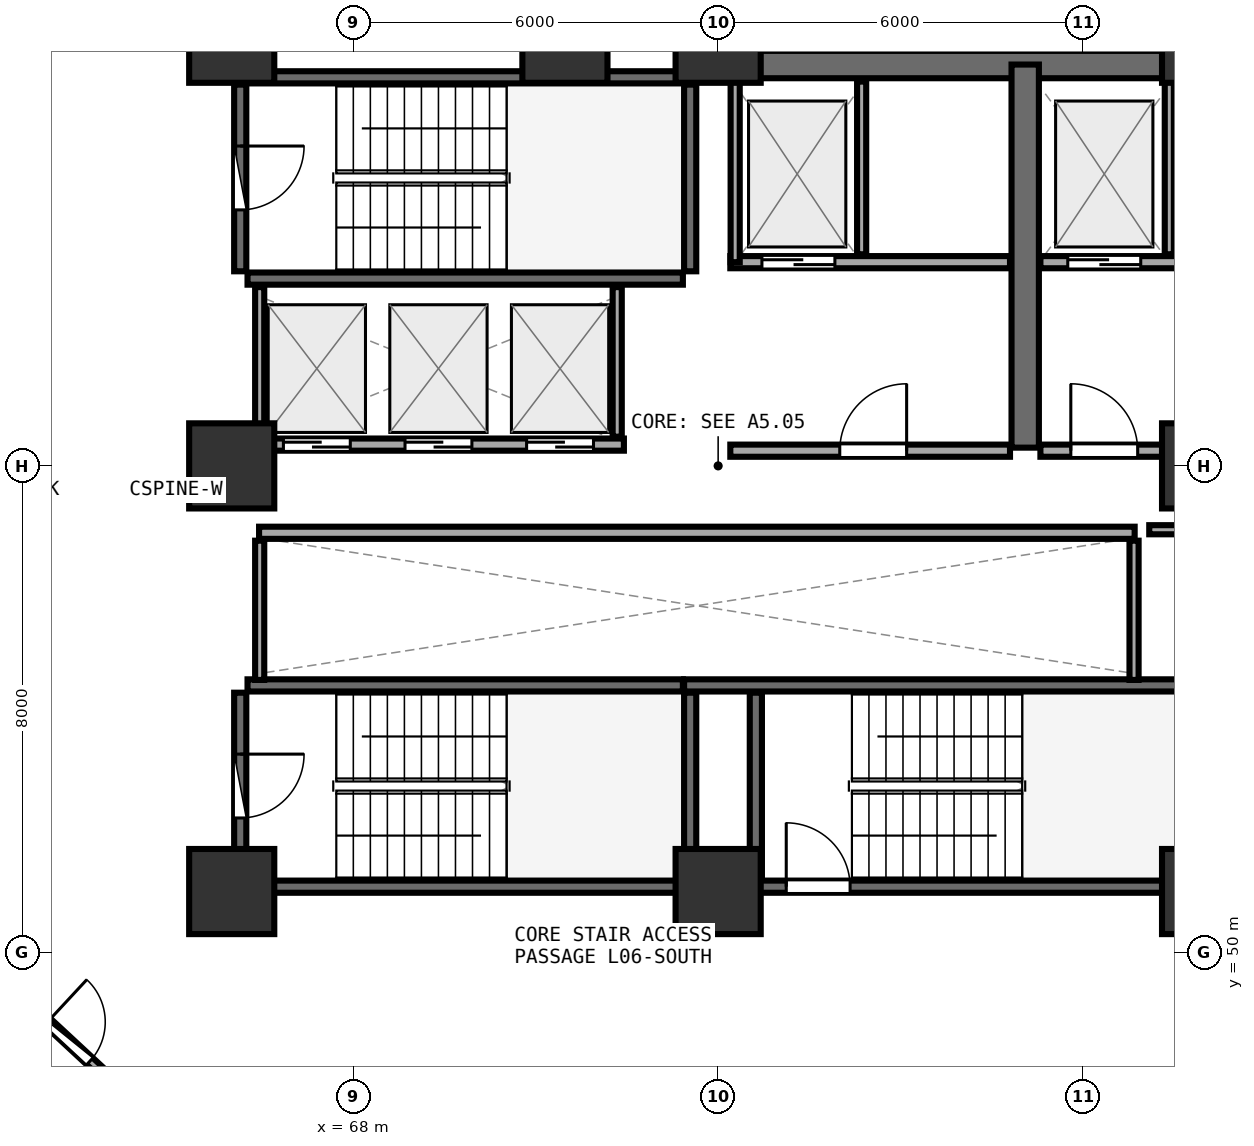
"""IFC4 building model, lengths in metres.
Left out: names, types, materials, properties, quantities, classifications, styles, units other than length and angle.
Written with IfcOpenShell. Run it as: python <this file> out.ifc"""

import sys

from ifc_helpers import new_model, si_unit, direction, frame, frame_2d, origin, origin_2d, place, context, subcontext, project, spatial, rectangle, extrude, element, fill, save


model = new_model("IFC4")
c1 = context("Model", 3, precision=1e-05, world=origin(), true_north=direction((0.0, 1.0)))
c2 = subcontext(c1, "Body", "Model", "MODEL_VIEW")
j1 = project(units=[si_unit("LENGTHUNIT", "METRE"), si_unit("PLANEANGLEUNIT", "RADIAN")], contexts=[c1])
p1 = place(None, origin())
s1 = spatial("IfcSite", under=j1, at=p1, CompositionType="ELEMENT")
p2 = place(p1, origin())
s2 = spatial("IfcBuilding", under=s1, at=p2, CompositionType="ELEMENT")
p3 = place(p2, frame((0.0, 0.0, 26.25)))
s3 = spatial("IfcBuildingStorey", under=s2, at=p3, CompositionType="ELEMENT", Elevation=26.25)
for number, where, z_axis, x_axis in (
    (1, (66.0, 51.0, 0.0), (0.0, 0.0, 1.0), (1.0, 0.0, 0.0)),
    (2, (74.0, 51.0, 0.0), (0.0, 0.0, 1.0), (1.0, 0.0, 0.0)),
    (3, (82.0, 51.0, 0.0), (0.0, 0.0, 1.0), (1.0, 0.0, 0.0)),
    (4, (82.0, 58.0, 0.0), (0.0, 0.0, 1.0), (1.0, 0.0, 0.0)),
    (5, (82.0, 65.0, 0.0), (0.0, 0.0, 1.0), (1.0, 0.0, 0.0)),
    (6, (74.0, 65.0, 0.0), (0.0, 0.0, 1.0), (1.0, 0.0, 0.0)),
    (7, (71.48, 65.0, 0.0), (0.0, 0.0, 1.0), (1.0, 0.0, 0.0)),
    (8, (66.0, 65.0, 0.0), (0.0, 0.0, 1.0), (1.0, 0.0, 0.0)),
    (9, (66.0, 58.0, 0.0), (0.0, 0.0, 1.0), (1.0, 0.0, 0.0)),
):
    element("IfcColumn", number, at=place(p3, frame(where, z_axis=z_axis, x_axis=x_axis)), inside=s3, PredefinedType="PILASTER", context=c2, shape_type="SweptSolid", body=[
        extrude(rectangle(XDim=1.4, YDim=1.4, at=origin_2d()), origin(), (0.0, 0.0, 1.0), 3.75),
    ])
p4 = place(p3, frame((66.26, 61.08, 0.0), z_axis=(0.0, 0.0, 1.0), x_axis=(1.0, 0.0, 0.0)))
e10 = element("IfcWall", 10, at=p4, inside=s3, PredefinedType="SHEAR", context=c2, shape_type="SweptSolid", body=[
    extrude(rectangle(XDim=7.16, YDim=0.2, at=frame_2d((3.58, 0.0))), origin(), (0.0, 0.0, 1.0), 3.49),
])
p5 = place(p3, frame((73.54, 61.2, 0.0), z_axis=(0.0, 0.0, 1.0), x_axis=(0.0, 1.0, 0.0)))
e11 = element("IfcWall", 11, at=p5, inside=s3, PredefinedType="SHEAR", context=c2, shape_type="SweptSolid", body=[
    extrude(rectangle(XDim=3.07, YDim=0.2, at=frame_2d((1.535, 0.0))), origin(), (0.0, 0.0, 1.0), 3.49),
])
p6 = place(p3, frame((73.42, 64.39, 0.0), z_axis=(0.0, 0.0, 1.0), x_axis=(-1.0, 0.0, 0.0)))
e12 = element("IfcWall", 12, at=p6, inside=s3, PredefinedType="SHEAR", context=c2, shape_type="SweptSolid", body=[
    extrude(rectangle(XDim=7.16, YDim=0.2, at=frame_2d((3.58, 0.0))), origin(), (0.0, 0.0, 1.0), 3.49),
])
p7 = place(p3, frame((66.14, 64.27, 0.0), z_axis=(0.0, 0.0, 1.0), x_axis=(0.0, -1.0, 0.0)))
e13 = element("IfcWall", 13, at=p7, inside=s3, PredefinedType="SHEAR", context=c2, shape_type="SweptSolid", body=[
    extrude(rectangle(XDim=3.07, YDim=0.2, at=frame_2d((1.535, 0.0))), origin(), (0.0, 0.0, 1.0), 3.49),
])
p8 = place(p7, frame((1.01, 0.0, 0.0)))
e14 = element("IfcOpeningElement", 14, at=p8, cuts=e13, PredefinedType="OPENING", context=c2, shape_type="SweptSolid", body=[
    extrude(rectangle(XDim=1.05, YDim=2.1, at=frame_2d((0.525, 1.05))), frame((0.0, 0.11, 0.0), z_axis=(0.0, -1.0, 0.0), x_axis=(1.0, 0.0, 0.0)), (0.0, 0.0, 1.0), 0.22),
])
p9 = place(p3, frame((74.0, 51.08, 0.0), z_axis=(0.0, 0.0, 1.0), x_axis=(1.0, 0.0, 0.0)))
e15 = element("IfcWall", 15, at=p9, inside=s3, PredefinedType="SHEAR", context=c2, shape_type="SweptSolid", body=[
    extrude(rectangle(XDim=7.9, YDim=0.2, at=frame_2d((3.95, 0.0))), origin(), (0.0, 0.0, 1.0), 3.49),
])
p10 = place(p9, frame((1.12, 0.0, 0.0)))
e16 = element("IfcOpeningElement", 16, at=p10, cuts=e15, PredefinedType="OPENING", context=c2, shape_type="SweptSolid", body=[
    extrude(rectangle(XDim=1.05, YDim=2.1, at=frame_2d((0.525, 1.05))), frame((0.0, 0.11, 0.0), z_axis=(0.0, -1.0, 0.0), x_axis=(1.0, 0.0, 0.0)), (0.0, 0.0, 1.0), 0.22),
])
p11 = place(p3, frame((81.9, 54.39, 0.0), z_axis=(0.0, 0.0, 1.0), x_axis=(-1.0, 0.0, 0.0)))
e17 = element("IfcWall", 17, at=p11, inside=s3, PredefinedType="SHEAR", context=c2, shape_type="SweptSolid", body=[
    extrude(rectangle(XDim=8.46, YDim=0.2, at=frame_2d((4.23, 0.0))), origin(), (0.0, 0.0, 1.0), 3.49),
])
p12 = place(p3, frame((74.62, 54.27, 0.0), z_axis=(0.0, 0.0, 1.0), x_axis=(0.0, -1.0, 0.0)))
e18 = element("IfcWall", 18, at=p12, inside=s3, PredefinedType="SHEAR", context=c2, shape_type="SweptSolid", body=[
    extrude(rectangle(XDim=3.07, YDim=0.2, at=frame_2d((1.535, 0.0))), origin(), (0.0, 0.0, 1.0), 3.49),
])
p13 = place(p3, frame((66.26, 51.08, 0.0), z_axis=(0.0, 0.0, 1.0), x_axis=(1.0, 0.0, 0.0)))
e19 = element("IfcWall", 19, at=p13, inside=s3, PredefinedType="SHEAR", context=c2, shape_type="SweptSolid", body=[
    extrude(rectangle(XDim=7.16, YDim=0.2, at=frame_2d((3.58, 0.0))), origin(), (0.0, 0.0, 1.0), 3.49),
])
p14 = place(p3, frame((73.54, 51.2, 0.0), z_axis=(0.0, 0.0, 1.0), x_axis=(0.0, 1.0, 0.0)))
e20 = element("IfcWall", 20, at=p14, inside=s3, PredefinedType="SHEAR", context=c2, shape_type="SweptSolid", body=[
    extrude(rectangle(XDim=3.07, YDim=0.2, at=frame_2d((1.535, 0.0))), origin(), (0.0, 0.0, 1.0), 3.49),
])
p15 = place(p3, frame((73.42, 54.39, 0.0), z_axis=(0.0, 0.0, 1.0), x_axis=(-1.0, 0.0, 0.0)))
e21 = element("IfcWall", 21, at=p15, inside=s3, PredefinedType="SHEAR", context=c2, shape_type="SweptSolid", body=[
    extrude(rectangle(XDim=7.16, YDim=0.2, at=frame_2d((3.58, 0.0))), origin(), (0.0, 0.0, 1.0), 3.49),
])
p16 = place(p3, frame((66.14, 54.27, 0.0), z_axis=(0.0, 0.0, 1.0), x_axis=(0.0, -1.0, 0.0)))
e22 = element("IfcWall", 22, at=p16, inside=s3, PredefinedType="SHEAR", context=c2, shape_type="SweptSolid", body=[
    extrude(rectangle(XDim=3.07, YDim=0.2, at=frame_2d((1.535, 0.0))), origin(), (0.0, 0.0, 1.0), 3.49),
])
p17 = place(p16, frame((1.01, 0.0, 0.0)))
e23 = element("IfcOpeningElement", 23, at=p17, cuts=e22, PredefinedType="OPENING", context=c2, shape_type="SweptSolid", body=[
    extrude(rectangle(XDim=1.05, YDim=2.1, at=frame_2d((0.525, 1.05))), frame((0.0, 0.11, 0.0), z_axis=(0.0, -1.0, 0.0), x_axis=(1.0, 0.0, 0.0)), (0.0, 0.0, 1.0), 0.22),
])
p18 = place(p3, frame((74.0, 64.6, 0.0), z_axis=(0.0, 0.0, 1.0), x_axis=(1.0, 0.0, 0.0)))
e24 = element("IfcWall", 24, at=p18, inside=s3, PredefinedType="SHEAR", context=c2, shape_type="SweptSolid", body=[
    extrude(rectangle(XDim=8.0, YDim=0.45, at=frame_2d((4.0, 0.0))), origin(), (0.0, 0.0, 1.0), 3.49),
])
p19 = place(p3, frame((79.05, 58.3, 0.0), z_axis=(0.0, 0.0, 1.0), x_axis=(0.0, 1.0, 0.0)))
e25 = element("IfcWall", 25, at=p19, inside=s3, PredefinedType="SHEAR", context=c2, shape_type="SweptSolid", body=[
    extrude(rectangle(XDim=6.3, YDim=0.45, at=frame_2d((3.15, 0.0))), origin(), (0.0, 0.0, 1.0), 3.49),
])
p20 = place(p3, frame((74.2, 61.35, 0.0), z_axis=(0.0, 0.0, 1.0), x_axis=(1.0, 0.0, 0.0)))
e26 = element("IfcWall", 26, at=p20, inside=s3, PredefinedType="SOLIDWALL", context=c2, shape_type="SweptSolid", body=[
    extrude(rectangle(XDim=4.6, YDim=0.2, at=frame_2d((2.3, 0.0))), origin(), (0.0, 0.0, 1.0), 3.48),
])
p21 = place(p20, frame((0.52, 0.0, 0.0)))
e27 = element("IfcOpeningElement", 27, at=p21, cuts=e26, PredefinedType="OPENING", context=c2, shape_type="SweptSolid", body=[
    extrude(rectangle(XDim=1.2, YDim=2.15, at=frame_2d((0.6, 1.075))), frame((0.0, 0.11, 0.0), z_axis=(0.0, -1.0, 0.0), x_axis=(1.0, 0.0, 0.0)), (0.0, 0.0, 1.0), 0.22),
])
p22 = place(p3, frame((74.28, 61.35, 0.0), z_axis=(0.0, 0.0, 1.0), x_axis=(0.0, 1.0, 0.0)))
e28 = element("IfcWall", 28, at=p22, inside=s3, PredefinedType="PARTITIONING", context=c2, shape_type="SweptSolid", body=[
    extrude(rectangle(XDim=2.97, YDim=0.15, at=frame_2d((1.485, 0.0))), origin(), (0.0, 0.0, 1.0), 3.48),
])
p23 = place(p3, frame((76.36, 61.48, 0.0), z_axis=(0.0, 0.0, 1.0), x_axis=(0.0, 1.0, 0.0)))
e29 = element("IfcWall", 29, at=p23, inside=s3, PredefinedType="PARTITIONING", context=c2, shape_type="SweptSolid", body=[
    extrude(rectangle(XDim=2.84, YDim=0.15, at=frame_2d((1.42, 0.0))), origin(), (0.0, 0.0, 1.0), 3.48),
])
p24 = place(p3, frame((79.3, 61.35, 0.0), z_axis=(0.0, 0.0, 1.0), x_axis=(1.0, 0.0, 0.0)))
e30 = element("IfcWall", 30, at=p24, inside=s3, PredefinedType="SOLIDWALL", context=c2, shape_type="SweptSolid", body=[
    extrude(rectangle(XDim=4.0, YDim=0.2, at=frame_2d((2.0, 0.0))), origin(), (0.0, 0.0, 1.0), 2.775),
])
p25 = place(p24, frame((0.45, 0.0, 0.0)))
e31 = element("IfcOpeningElement", 31, at=p25, cuts=e30, PredefinedType="OPENING", context=c2, shape_type="SweptSolid", body=[
    extrude(rectangle(XDim=1.2, YDim=2.15, at=frame_2d((0.6, 1.075))), frame((0.0, 0.11, 0.0), z_axis=(0.0, -1.0, 0.0), x_axis=(1.0, 0.0, 0.0)), (0.0, 0.0, 1.0), 0.22),
])
p26 = place(p3, frame((81.42, 61.48, 0.0), z_axis=(0.0, 0.0, 1.0), x_axis=(0.0, 1.0, 0.0)))
e32 = element("IfcWall", 32, at=p26, inside=s3, PredefinedType="PARTITIONING", context=c2, shape_type="SweptSolid", body=[
    extrude(rectangle(XDim=2.84, YDim=0.15, at=frame_2d((1.42, 0.0))), origin(), (0.0, 0.0, 1.0), 3.48),
])
p27 = place(p3, frame((74.2, 58.25, 0.0), z_axis=(0.0, 0.0, 1.0), x_axis=(1.0, 0.0, 0.0)))
e33 = element("IfcWall", 33, at=p27, inside=s3, PredefinedType="SOLIDWALL", context=c2, shape_type="SweptSolid", body=[
    extrude(rectangle(XDim=4.6, YDim=0.2, at=frame_2d((2.3, 0.0))), origin(), (0.0, 0.0, 1.0), 3.48),
])
p28 = place(p27, frame((1.8, 0.0, 0.0)))
e34 = element("IfcOpeningElement", 34, at=p28, cuts=e33, PredefinedType="OPENING", context=c2, shape_type="SweptSolid", body=[
    extrude(rectangle(XDim=1.1, YDim=2.1, at=frame_2d((0.55, 1.05))), frame((0.0, 0.11, 0.0), z_axis=(0.0, -1.0, 0.0), x_axis=(1.0, 0.0, 0.0)), (0.0, 0.0, 1.0), 0.22),
])
p29 = place(p3, frame((79.3, 58.25, 0.0), z_axis=(0.0, 0.0, 1.0), x_axis=(1.0, 0.0, 0.0)))
e35 = element("IfcWall", 35, at=p29, inside=s3, PredefinedType="SOLIDWALL", context=c2, shape_type="SweptSolid", body=[
    extrude(rectangle(XDim=4.0, YDim=0.2, at=frame_2d((2.0, 0.0))), origin(), (0.0, 0.0, 1.0), 2.775),
])
p30 = place(p29, frame((0.5, 0.0, 0.0)))
e36 = element("IfcOpeningElement", 36, at=p30, cuts=e35, PredefinedType="OPENING", context=c2, shape_type="SweptSolid", body=[
    extrude(rectangle(XDim=1.1, YDim=2.1, at=frame_2d((0.55, 1.05))), frame((0.0, 0.11, 0.0), z_axis=(0.0, -1.0, 0.0), x_axis=(1.0, 0.0, 0.0)), (0.0, 0.0, 1.0), 0.22),
])
p31 = place(p3, frame((66.45, 58.35, 0.0), z_axis=(0.0, 0.0, 1.0), x_axis=(1.0, 0.0, 0.0)))
e37 = element("IfcWall", 37, at=p31, inside=s3, PredefinedType="SOLIDWALL", context=c2, shape_type="SweptSolid", body=[
    extrude(rectangle(XDim=6.0, YDim=0.2, at=frame_2d((3.0, 0.0))), origin(), (0.0, 0.0, 1.0), 3.48),
])
p32 = place(p31, frame((0.4, 0.0, 0.0)))
e38 = element("IfcOpeningElement", 38, at=p32, cuts=e37, PredefinedType="OPENING", context=c2, shape_type="SweptSolid", body=[
    extrude(rectangle(XDim=1.1, YDim=2.1, at=frame_2d((0.55, 1.05))), frame((0.0, 0.11, 0.0), z_axis=(0.0, -1.0, 0.0), x_axis=(1.0, 0.0, 0.0)), (0.0, 0.0, 1.0), 0.22),
])
p33 = place(p31, frame((2.4, 0.0, 0.0)))
e39 = element("IfcOpeningElement", 39, at=p33, cuts=e37, PredefinedType="OPENING", context=c2, shape_type="SweptSolid", body=[
    extrude(rectangle(XDim=1.1, YDim=2.1, at=frame_2d((0.55, 1.05))), frame((0.0, 0.11, 0.0), z_axis=(0.0, -1.0, 0.0), x_axis=(1.0, 0.0, 0.0)), (0.0, 0.0, 1.0), 0.22),
])
p34 = place(p31, frame((4.4, 0.0, 0.0)))
e40 = element("IfcOpeningElement", 40, at=p34, cuts=e37, PredefinedType="OPENING", context=c2, shape_type="SweptSolid", body=[
    extrude(rectangle(XDim=1.1, YDim=2.1, at=frame_2d((0.55, 1.05))), frame((0.0, 0.11, 0.0), z_axis=(0.0, -1.0, 0.0), x_axis=(1.0, 0.0, 0.0)), (0.0, 0.0, 1.0), 0.22),
])
for number, where, z_axis, x_axis in (
    (41, (66.46, 58.48, 0.0), (0.0, 0.0, 1.0), (0.0, 1.0, 0.0)),
    (42, (72.34, 58.48, 0.0), (0.0, 0.0, 1.0), (0.0, 1.0, 0.0)),
):
    element("IfcWall", number, at=place(p3, frame(where, z_axis=z_axis, x_axis=x_axis)), inside=s3, PredefinedType="PARTITIONING", context=c2, shape_type="SweptSolid", body=[
        extrude(rectangle(XDim=2.46, YDim=0.15, at=frame_2d((1.23, 0.0))), origin(), (0.0, 0.0, 1.0), 3.48),
    ])
p35 = place(p3, frame((66.45, 56.9, 0.0), z_axis=(0.0, 0.0, 1.0), x_axis=(1.0, 0.0, 0.0)))
e43 = element("IfcWall", 43, at=p35, inside=s3, PredefinedType="SOLIDWALL", context=c2, shape_type="SweptSolid", body=[
    extrude(rectangle(XDim=14.4, YDim=0.2, at=frame_2d((7.2, 0.0))), origin(), (0.0, 0.0, 1.0), 3.48),
])
for number, where, z_axis, x_axis in (
    (44, (66.46, 54.48, 0.0), (0.0, 0.0, 1.0), (0.0, 1.0, 0.0)),
    (45, (80.84, 54.48, 0.0), (0.0, 0.0, 1.0), (0.0, 1.0, 0.0)),
):
    element("IfcWall", number, at=place(p3, frame(where, z_axis=z_axis, x_axis=x_axis)), inside=s3, PredefinedType="PARTITIONING", context=c2, shape_type="SweptSolid", body=[
        extrude(rectangle(XDim=2.29, YDim=0.15, at=frame_2d((1.145, 0.0))), origin(), (0.0, 0.0, 1.0), 3.48),
    ])
p36 = place(p3, frame((64.446, 68.507, 0.0), z_axis=(0.0, 0.0, 1.0), x_axis=(-0.660323401664, -0.75098136143, 0.0)))
e46 = element("IfcWall", 46, at=p36, inside=s3, PredefinedType="PARTITIONING", context=c2, shape_type="SweptSolid", body=[
    extrude(rectangle(XDim=5.857, YDim=0.12, at=frame_2d((2.929, 0.0))), origin(), (0.0, 0.0, 1.0), 2.875),
])
p37 = place(p36, frame((2.479, 0.0, 0.0)))
e47 = element("IfcOpeningElement", 47, at=p37, cuts=e46, PredefinedType="OPENING", context=c2, shape_type="SweptSolid", body=[
    extrude(rectangle(XDim=0.9, YDim=2.08, at=frame_2d((0.45, 1.04))), frame((0.0, 0.07, 0.0), z_axis=(0.0, -1.0, 0.0), x_axis=(1.0, 0.0, 0.0)), (0.0, 0.0, 1.0), 0.14),
])
p38 = place(p3, frame((62.194, 49.575, 0.0), z_axis=(0.0, 0.0, 1.0), x_axis=(0.7329267348, -0.680307578538, 0.0)))
e48 = element("IfcWall", 48, at=p38, inside=s3, PredefinedType="PARTITIONING", context=c2, shape_type="SweptSolid", body=[
    extrude(rectangle(XDim=3.067, YDim=0.15, at=frame_2d((1.533, 0.0))), origin(), (0.0, 0.0, 1.0), 2.875),
])
p39 = place(p38, frame((1.059, 0.0, 0.0)))
e49 = element("IfcOpeningElement", 49, at=p39, cuts=e48, PredefinedType="OPENING", context=c2, shape_type="SweptSolid", body=[
    extrude(rectangle(XDim=0.95, YDim=2.08, at=frame_2d((0.475, 1.04))), frame((0.0, 0.085, 0.0), z_axis=(0.0, -1.0, 0.0), x_axis=(1.0, 0.0, 0.0)), (0.0, 0.0, 1.0), 0.17),
])
p40 = place(p3, frame((82.64, 56.95, 0.0), z_axis=(0.0, 0.0, 1.0), x_axis=(-1.0, 0.0, 0.0)))
e50 = element("IfcWall", 50, at=p40, inside=s3, PredefinedType="PARTITIONING", context=c2, shape_type="SweptSolid", body=[
    extrude(rectangle(XDim=1.55, YDim=0.15, at=frame_2d((0.775, 0.0))), origin(), (0.0, 0.0, 1.0), 2.775),
])
p41 = place(p8, origin())
e51 = element("IfcDoor", 51, at=p41, inside=s3, OperationType="SINGLE_SWING_LEFT", PredefinedType="DOOR", context=c2, shape_type="SweptSolid", body=[
    extrude(rectangle(XDim=1.05, YDim=2.1, at=frame_2d((0.525, 1.05))), frame((0.0, 0.025, 0.0), z_axis=(0.0, -1.0, 0.0), x_axis=(1.0, 0.0, 0.0)), (0.0, 0.0, 1.0), 0.05),
])
fill(e14, e51)
p42 = place(p10, origin())
e52 = element("IfcDoor", 52, at=p42, inside=s3, OperationType="SINGLE_SWING_LEFT", PredefinedType="DOOR", context=c2, shape_type="SweptSolid", body=[
    extrude(rectangle(XDim=1.05, YDim=2.1, at=frame_2d((0.525, 1.05))), frame((0.0, 0.025, 0.0), z_axis=(0.0, -1.0, 0.0), x_axis=(1.0, 0.0, 0.0)), (0.0, 0.0, 1.0), 0.05),
])
fill(e16, e52)
p43 = place(p17, origin())
e53 = element("IfcDoor", 53, at=p43, inside=s3, OperationType="SINGLE_SWING_LEFT", PredefinedType="DOOR", context=c2, shape_type="SweptSolid", body=[
    extrude(rectangle(XDim=1.05, YDim=2.1, at=frame_2d((0.525, 1.05))), frame((0.0, 0.025, 0.0), z_axis=(0.0, -1.0, 0.0), x_axis=(1.0, 0.0, 0.0)), (0.0, 0.0, 1.0), 0.05),
])
fill(e23, e53)
p44 = place(p21, origin())
e54 = element("IfcDoor", 54, at=p44, inside=s3, OperationType="DOUBLE_DOOR_SLIDING", PredefinedType="DOOR", context=c2, shape_type="SweptSolid", body=[
    extrude(rectangle(XDim=1.2, YDim=2.15, at=frame_2d((0.6, 1.075))), frame((0.0, 0.025, 0.0), z_axis=(0.0, -1.0, 0.0), x_axis=(1.0, 0.0, 0.0)), (0.0, 0.0, 1.0), 0.05),
])
fill(e27, e54)
p45 = place(p25, origin())
e55 = element("IfcDoor", 55, at=p45, inside=s3, OperationType="DOUBLE_DOOR_SLIDING", PredefinedType="DOOR", context=c2, shape_type="SweptSolid", body=[
    extrude(rectangle(XDim=1.2, YDim=2.15, at=frame_2d((0.6, 1.075))), frame((0.0, 0.025, 0.0), z_axis=(0.0, -1.0, 0.0), x_axis=(1.0, 0.0, 0.0)), (0.0, 0.0, 1.0), 0.05),
])
fill(e31, e55)
p46 = place(p28, frame((1.1, 0.0, 0.0), z_axis=(0.0, 0.0, 1.0), x_axis=(-1.0, 0.0, 0.0)))
e56 = element("IfcDoor", 56, at=p46, inside=s3, OperationType="SINGLE_SWING_LEFT", PredefinedType="DOOR", context=c2, shape_type="SweptSolid", body=[
    extrude(rectangle(XDim=1.1, YDim=2.1, at=frame_2d((0.55, 1.05))), frame((0.0, 0.025, 0.0), z_axis=(0.0, -1.0, 0.0), x_axis=(1.0, 0.0, 0.0)), (0.0, 0.0, 1.0), 0.05),
])
fill(e34, e56)
p47 = place(p30, frame((1.1, 0.0, 0.0), z_axis=(0.0, 0.0, 1.0), x_axis=(-1.0, 0.0, 0.0)))
e57 = element("IfcDoor", 57, at=p47, inside=s3, OperationType="SINGLE_SWING_RIGHT", PredefinedType="DOOR", context=c2, shape_type="SweptSolid", body=[
    extrude(rectangle(XDim=1.1, YDim=2.1, at=frame_2d((0.55, 1.05))), frame((0.0, 0.025, 0.0), z_axis=(0.0, -1.0, 0.0), x_axis=(1.0, 0.0, 0.0)), (0.0, 0.0, 1.0), 0.05),
])
fill(e36, e57)
p48 = place(p32, origin())
e58 = element("IfcDoor", 58, at=p48, inside=s3, OperationType="DOUBLE_DOOR_SLIDING", PredefinedType="DOOR", context=c2, shape_type="SweptSolid", body=[
    extrude(rectangle(XDim=1.1, YDim=2.1, at=frame_2d((0.55, 1.05))), frame((0.0, 0.025, 0.0), z_axis=(0.0, -1.0, 0.0), x_axis=(1.0, 0.0, 0.0)), (0.0, 0.0, 1.0), 0.05),
])
fill(e38, e58)
p49 = place(p33, origin())
e59 = element("IfcDoor", 59, at=p49, inside=s3, OperationType="DOUBLE_DOOR_SLIDING", PredefinedType="DOOR", context=c2, shape_type="SweptSolid", body=[
    extrude(rectangle(XDim=1.1, YDim=2.1, at=frame_2d((0.55, 1.05))), frame((0.0, 0.025, 0.0), z_axis=(0.0, -1.0, 0.0), x_axis=(1.0, 0.0, 0.0)), (0.0, 0.0, 1.0), 0.05),
])
fill(e39, e59)
p50 = place(p34, origin())
e60 = element("IfcDoor", 60, at=p50, inside=s3, OperationType="DOUBLE_DOOR_SLIDING", PredefinedType="DOOR", context=c2, shape_type="SweptSolid", body=[
    extrude(rectangle(XDim=1.1, YDim=2.1, at=frame_2d((0.55, 1.05))), frame((0.0, 0.025, 0.0), z_axis=(0.0, -1.0, 0.0), x_axis=(1.0, 0.0, 0.0)), (0.0, 0.0, 1.0), 0.05),
])
fill(e40, e60)
p51 = place(p39, origin())
e61 = element("IfcDoor", 61, at=p51, inside=s3, OperationType="SINGLE_SWING_LEFT", PredefinedType="DOOR", context=c2, shape_type="SweptSolid", body=[
    extrude(rectangle(XDim=0.95, YDim=2.08, at=frame_2d((0.475, 1.04))), frame((0.0, 0.025, 0.0), z_axis=(0.0, -1.0, 0.0), x_axis=(1.0, 0.0, 0.0)), (0.0, 0.0, 1.0), 0.05),
])
fill(e49, e61)
save(model, sys.argv[1])
